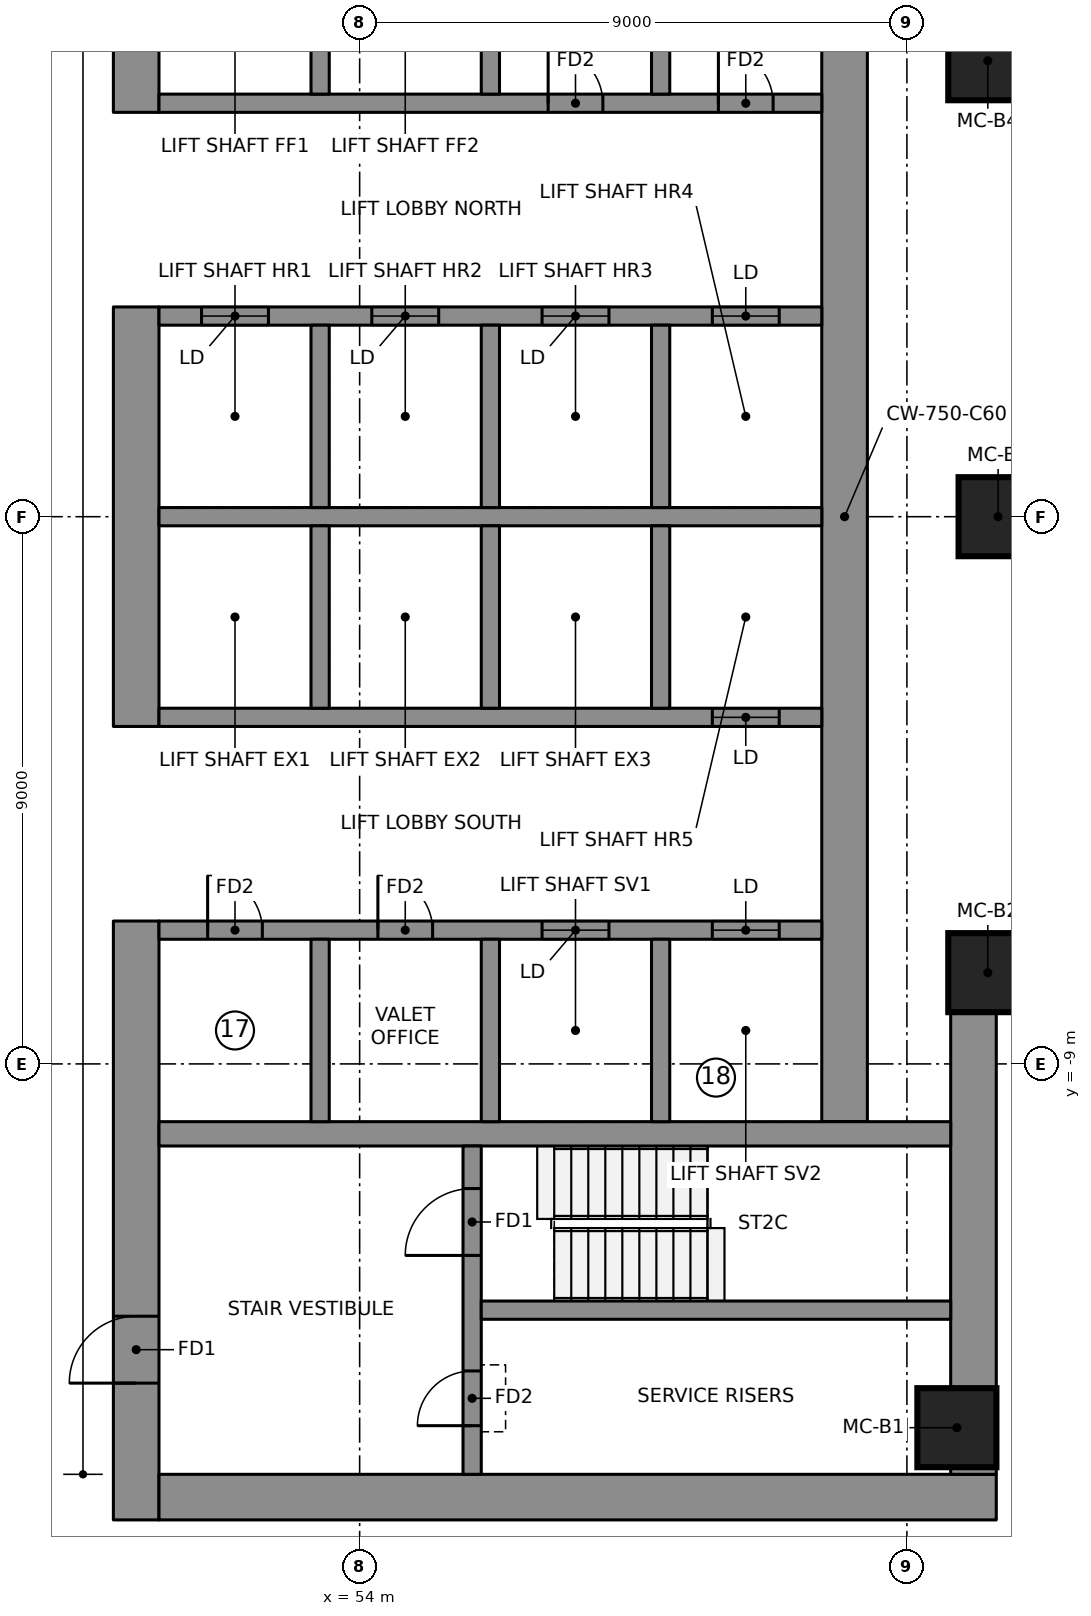
"""IFC4 building model, lengths in metres.
Left out: names, types, materials, properties, quantities, classifications, styles, units other than length and angle.
Written with IfcOpenShell. Run it as: python <this file> out.ifc"""

import sys

from ifc_helpers import new_model, si_unit, direction, frame, frame_2d, origin, origin_2d, place, context, subcontext, project, spatial, rectangle, extrude, element, fill, save


model = new_model("IFC4")
c1 = context("Model", 3, precision=1e-05, world=origin(), true_north=direction((0.0, 1.0)))
c2 = subcontext(c1, "Body", "Model", "MODEL_VIEW")
j1 = project(units=[si_unit("LENGTHUNIT", "METRE"), si_unit("PLANEANGLEUNIT", "RADIAN")], contexts=[c1])
p1 = place(None, origin())
s1 = spatial("IfcSite", under=j1, at=p1, CompositionType="ELEMENT")
p2 = place(p1, origin())
s2 = spatial("IfcBuilding", under=s1, at=p2, CompositionType="ELEMENT")
p3 = place(p2, frame((0.0, 0.0, 200.35)))
s3 = spatial("IfcBuildingStorey", under=s2, at=p3, CompositionType="ELEMENT", Elevation=200.35)
p4 = place(p3, frame((50.325, 6.65, 0.0), z_axis=(0.0, 0.0, 1.0), x_axis=(0.0, 1.0, 0.0)))
e1 = element("IfcWall", 1, at=p4, inside=s3, PredefinedType="SHEAR", context=c2, shape_type="SweptSolid", body=[
    extrude(rectangle(XDim=9.85, YDim=0.75, at=frame_2d((4.925, 0.0))), origin(), (0.0, 0.0, 1.0), 3.55),
])
p5 = place(p4, frame((6.5, 0.0, 0.0)))
e2 = element("IfcOpeningElement", 2, at=p5, cuts=e1, PredefinedType="OPENING", context=c2, shape_type="SweptSolid", body=[
    extrude(rectangle(XDim=1.1, YDim=2.1, at=frame_2d((0.55, 1.05))), frame((0.0, 0.385, 0.0), z_axis=(0.0, -1.0, 0.0), x_axis=(1.0, 0.0, 0.0)), (0.0, 0.0, 1.0), 0.77),
])
p6 = place(p3, frame((50.325, -3.45, 0.0), z_axis=(0.0, 0.0, 1.0), x_axis=(0.0, 1.0, 0.0)))
e3 = element("IfcWall", 3, at=p6, inside=s3, PredefinedType="SHEAR", context=c2, shape_type="SweptSolid", body=[
    extrude(rectangle(XDim=6.9, YDim=0.75, at=frame_2d((3.45, 0.0))), origin(), (0.0, 0.0, 1.0), 3.55),
])
p7 = place(p3, frame((50.325, -16.5, 0.0), z_axis=(0.0, 0.0, 1.0), x_axis=(0.0, 1.0, 0.0)))
e4 = element("IfcWall", 4, at=p7, inside=s3, PredefinedType="SHEAR", context=c2, shape_type="SweptSolid", body=[
    extrude(rectangle(XDim=9.85, YDim=0.75, at=frame_2d((4.925, 0.0))), origin(), (0.0, 0.0, 1.0), 3.55),
])
p8 = place(p7, frame((2.25, 0.0, 0.0)))
e5 = element("IfcOpeningElement", 5, at=p8, cuts=e4, PredefinedType="OPENING", context=c2, shape_type="SweptSolid", body=[
    extrude(rectangle(XDim=1.1, YDim=2.1, at=frame_2d((0.55, 1.05))), frame((0.0, 0.385, 0.0), z_axis=(0.0, -1.0, 0.0), x_axis=(1.0, 0.0, 0.0)), (0.0, 0.0, 1.0), 0.77),
])
p9 = place(p3, frame((50.7, -16.125, 0.0), z_axis=(0.0, 0.0, 1.0), x_axis=(1.0, 0.0, 0.0)))
e6 = element("IfcWall", 6, at=p9, inside=s3, PredefinedType="SHEAR", context=c2, shape_type="SweptSolid", body=[
    extrude(rectangle(XDim=13.77, YDim=0.75, at=frame_2d((6.885, 0.0))), origin(), (0.0, 0.0, 1.0), 3.55),
])
p10 = place(p3, frame((64.095, -15.75, 0.0), z_axis=(0.0, 0.0, 1.0), x_axis=(0.0, 1.0, 0.0)))
e7 = element("IfcWall", 7, at=p10, inside=s3, PredefinedType="SHEAR", context=c2, shape_type="SweptSolid", body=[
    extrude(rectangle(XDim=7.651, YDim=0.75, at=frame_2d((3.825, 0.0))), origin(), (0.0, 0.0, 1.0), 3.55),
])
p11 = place(p3, frame((61.975, -9.95, 0.0), z_axis=(0.0, 0.0, 1.0), x_axis=(0.0, 1.0, 0.0)))
e8 = element("IfcWall", 8, at=p11, inside=s3, PredefinedType="SHEAR", context=c2, shape_type="SweptSolid", body=[
    extrude(rectangle(XDim=19.9, YDim=0.75, at=frame_2d((9.95, 0.0))), origin(), (0.0, 0.0, 1.0), 3.55),
])
p12 = place(p3, frame((50.7, -10.15, 0.0), z_axis=(0.0, 0.0, 1.0), x_axis=(1.0, 0.0, 0.0)))
e9 = element("IfcWall", 9, at=p12, inside=s3, PredefinedType="SHEAR", context=c2, shape_type="SweptSolid", body=[
    extrude(rectangle(XDim=13.02, YDim=0.4, at=frame_2d((6.51, 0.0))), origin(), (0.0, 0.0, 1.0), 3.55),
])
p13 = place(p3, frame((50.7, 0.0, 0.0), z_axis=(0.0, 0.0, 1.0), x_axis=(1.0, 0.0, 0.0)))
e10 = element("IfcWall", 10, at=p13, inside=s3, PredefinedType="SHEAR", context=c2, shape_type="SweptSolid", body=[
    extrude(rectangle(XDim=10.9, YDim=0.3, at=frame_2d((5.45, 0.0))), origin(), (0.0, 0.0, 1.0), 3.55),
])
p14 = place(p3, frame((50.7, 3.3, 0.0), z_axis=(0.0, 0.0, 1.0), x_axis=(1.0, 0.0, 0.0)))
e11 = element("IfcWall", 11, at=p14, inside=s3, PredefinedType="SHEAR", context=c2, shape_type="SweptSolid", body=[
    extrude(rectangle(XDim=10.9, YDim=0.3, at=frame_2d((5.45, 0.0))), origin(), (0.0, 0.0, 1.0), 3.55),
])
p15 = place(p14, frame((0.7, 0.0, 0.0)))
e12 = element("IfcOpeningElement", 12, at=p15, cuts=e11, PredefinedType="OPENING", context=c2, shape_type="SweptSolid", body=[
    extrude(rectangle(XDim=1.1, YDim=2.1, at=frame_2d((0.55, 1.05))), frame((0.0, 0.16, 0.0), z_axis=(0.0, -1.0, 0.0), x_axis=(1.0, 0.0, 0.0)), (0.0, 0.0, 1.0), 0.32),
])
p16 = place(p14, frame((3.5, 0.0, 0.0)))
e13 = element("IfcOpeningElement", 13, at=p16, cuts=e11, PredefinedType="OPENING", context=c2, shape_type="SweptSolid", body=[
    extrude(rectangle(XDim=1.1, YDim=2.1, at=frame_2d((0.55, 1.05))), frame((0.0, 0.16, 0.0), z_axis=(0.0, -1.0, 0.0), x_axis=(1.0, 0.0, 0.0)), (0.0, 0.0, 1.0), 0.32),
])
p17 = place(p14, frame((6.3, 0.0, 0.0)))
e14 = element("IfcOpeningElement", 14, at=p17, cuts=e11, PredefinedType="OPENING", context=c2, shape_type="SweptSolid", body=[
    extrude(rectangle(XDim=1.1, YDim=2.1, at=frame_2d((0.55, 1.05))), frame((0.0, 0.16, 0.0), z_axis=(0.0, -1.0, 0.0), x_axis=(1.0, 0.0, 0.0)), (0.0, 0.0, 1.0), 0.32),
])
p18 = place(p14, frame((9.1, 0.0, 0.0)))
e15 = element("IfcOpeningElement", 15, at=p18, cuts=e11, PredefinedType="OPENING", context=c2, shape_type="SweptSolid", body=[
    extrude(rectangle(XDim=1.1, YDim=2.1, at=frame_2d((0.55, 1.05))), frame((0.0, 0.16, 0.0), z_axis=(0.0, -1.0, 0.0), x_axis=(1.0, 0.0, 0.0)), (0.0, 0.0, 1.0), 0.32),
])
p19 = place(p3, frame((50.7, 6.8, 0.0), z_axis=(0.0, 0.0, 1.0), x_axis=(1.0, 0.0, 0.0)))
e16 = element("IfcWall", 16, at=p19, inside=s3, PredefinedType="SHEAR", context=c2, shape_type="SweptSolid", body=[
    extrude(rectangle(XDim=10.9, YDim=0.3, at=frame_2d((5.45, 0.0))), origin(), (0.0, 0.0, 1.0), 3.55),
])
p20 = place(p19, frame((6.4, 0.0, 0.0)))
e17 = element("IfcOpeningElement", 17, at=p20, cuts=e16, PredefinedType="OPENING", context=c2, shape_type="SweptSolid", body=[
    extrude(rectangle(XDim=0.9, YDim=2.1, at=frame_2d((0.45, 1.05))), frame((0.0, 0.16, 0.0), z_axis=(0.0, -1.0, 0.0), x_axis=(1.0, 0.0, 0.0)), (0.0, 0.0, 1.0), 0.32),
])
p21 = place(p19, frame((9.2, 0.0, 0.0)))
e18 = element("IfcOpeningElement", 18, at=p21, cuts=e16, PredefinedType="OPENING", context=c2, shape_type="SweptSolid", body=[
    extrude(rectangle(XDim=0.9, YDim=2.1, at=frame_2d((0.45, 1.05))), frame((0.0, 0.16, 0.0), z_axis=(0.0, -1.0, 0.0), x_axis=(1.0, 0.0, 0.0)), (0.0, 0.0, 1.0), 0.32),
])
for number, where, z_axis, x_axis in (
    (19, (53.35, 0.15, 0.0), (0.0, 0.0, 1.0), (0.0, 1.0, 0.0)),
    (20, (53.35, 6.95, 0.0), (0.0, 0.0, 1.0), (0.0, 1.0, 0.0)),
    (21, (56.15, 0.15, 0.0), (0.0, 0.0, 1.0), (0.0, 1.0, 0.0)),
    (22, (56.15, 6.95, 0.0), (0.0, 0.0, 1.0), (0.0, 1.0, 0.0)),
    (23, (58.95, 0.15, 0.0), (0.0, 0.0, 1.0), (0.0, 1.0, 0.0)),
    (24, (58.95, 6.95, 0.0), (0.0, 0.0, 1.0), (0.0, 1.0, 0.0)),
):
    element("IfcWall", number, at=place(p3, frame(where, z_axis=z_axis, x_axis=x_axis)), inside=s3, PredefinedType="SHEAR", context=c2, shape_type="SweptSolid", body=[
        extrude(rectangle(XDim=3.0, YDim=0.3, at=frame_2d((1.5, 0.0))), origin(), (0.0, 0.0, 1.0), 3.55),
    ])
p22 = place(p3, frame((50.7, -3.3, 0.0), z_axis=(0.0, 0.0, 1.0), x_axis=(1.0, 0.0, 0.0)))
e25 = element("IfcWall", 25, at=p22, inside=s3, PredefinedType="SHEAR", context=c2, shape_type="SweptSolid", body=[
    extrude(rectangle(XDim=10.9, YDim=0.3, at=frame_2d((5.45, 0.0))), origin(), (0.0, 0.0, 1.0), 3.55),
])
p23 = place(p22, frame((9.1, 0.0, 0.0)))
e26 = element("IfcOpeningElement", 26, at=p23, cuts=e25, PredefinedType="OPENING", context=c2, shape_type="SweptSolid", body=[
    extrude(rectangle(XDim=1.1, YDim=2.1, at=frame_2d((0.55, 1.05))), frame((0.0, 0.16, 0.0), z_axis=(0.0, -1.0, 0.0), x_axis=(1.0, 0.0, 0.0)), (0.0, 0.0, 1.0), 0.32),
])
p24 = place(p3, frame((50.7, -6.8, 0.0), z_axis=(0.0, 0.0, 1.0), x_axis=(1.0, 0.0, 0.0)))
e27 = element("IfcWall", 27, at=p24, inside=s3, PredefinedType="SHEAR", context=c2, shape_type="SweptSolid", body=[
    extrude(rectangle(XDim=10.9, YDim=0.3, at=frame_2d((5.45, 0.0))), origin(), (0.0, 0.0, 1.0), 3.55),
])
p25 = place(p24, frame((6.3, 0.0, 0.0)))
e28 = element("IfcOpeningElement", 28, at=p25, cuts=e27, PredefinedType="OPENING", context=c2, shape_type="SweptSolid", body=[
    extrude(rectangle(XDim=1.1, YDim=2.1, at=frame_2d((0.55, 1.05))), frame((0.0, 0.16, 0.0), z_axis=(0.0, -1.0, 0.0), x_axis=(1.0, 0.0, 0.0)), (0.0, 0.0, 1.0), 0.32),
])
p26 = place(p24, frame((9.1, 0.0, 0.0)))
e29 = element("IfcOpeningElement", 29, at=p26, cuts=e27, PredefinedType="OPENING", context=c2, shape_type="SweptSolid", body=[
    extrude(rectangle(XDim=1.1, YDim=2.1, at=frame_2d((0.55, 1.05))), frame((0.0, 0.16, 0.0), z_axis=(0.0, -1.0, 0.0), x_axis=(1.0, 0.0, 0.0)), (0.0, 0.0, 1.0), 0.32),
])
p27 = place(p24, frame((0.8, 0.0, 0.0)))
e30 = element("IfcOpeningElement", 30, at=p27, cuts=e27, PredefinedType="OPENING", context=c2, shape_type="SweptSolid", body=[
    extrude(rectangle(XDim=0.9, YDim=2.1, at=frame_2d((0.45, 1.05))), frame((0.0, 0.16, 0.0), z_axis=(0.0, -1.0, 0.0), x_axis=(1.0, 0.0, 0.0)), (0.0, 0.0, 1.0), 0.32),
])
p28 = place(p24, frame((3.6, 0.0, 0.0)))
e31 = element("IfcOpeningElement", 31, at=p28, cuts=e27, PredefinedType="OPENING", context=c2, shape_type="SweptSolid", body=[
    extrude(rectangle(XDim=0.9, YDim=2.1, at=frame_2d((0.45, 1.05))), frame((0.0, 0.16, 0.0), z_axis=(0.0, -1.0, 0.0), x_axis=(1.0, 0.0, 0.0)), (0.0, 0.0, 1.0), 0.32),
])
for number, where, z_axis, x_axis in (
    (32, (53.35, -3.15, 0.0), (0.0, 0.0, 1.0), (0.0, 1.0, 0.0)),
    (33, (53.35, -9.95, 0.0), (0.0, 0.0, 1.0), (0.0, 1.0, 0.0)),
    (34, (56.15, -3.15, 0.0), (0.0, 0.0, 1.0), (0.0, 1.0, 0.0)),
    (35, (56.15, -9.95, 0.0), (0.0, 0.0, 1.0), (0.0, 1.0, 0.0)),
    (36, (58.95, -3.15, 0.0), (0.0, 0.0, 1.0), (0.0, 1.0, 0.0)),
    (37, (58.95, -9.95, 0.0), (0.0, 0.0, 1.0), (0.0, 1.0, 0.0)),
):
    element("IfcWall", number, at=place(p3, frame(where, z_axis=z_axis, x_axis=x_axis)), inside=s3, PredefinedType="SHEAR", context=c2, shape_type="SweptSolid", body=[
        extrude(rectangle(XDim=3.0, YDim=0.3, at=frame_2d((1.5, 0.0))), origin(), (0.0, 0.0, 1.0), 3.55),
    ])
p29 = place(p3, frame((55.85, -15.75, 0.0), z_axis=(0.0, 0.0, 1.0), x_axis=(0.0, 1.0, 0.0)))
e38 = element("IfcWall", 38, at=p29, inside=s3, PredefinedType="SHEAR", context=c2, shape_type="SweptSolid", body=[
    extrude(rectangle(XDim=5.4, YDim=0.3, at=frame_2d((2.7, 0.0))), origin(), (0.0, 0.0, 1.0), 3.55),
])
p30 = place(p29, frame((3.6, 0.0, 0.0)))
e39 = element("IfcOpeningElement", 39, at=p30, cuts=e38, PredefinedType="OPENING", context=c2, shape_type="SweptSolid", body=[
    extrude(rectangle(XDim=1.1, YDim=2.1, at=frame_2d((0.55, 1.05))), frame((0.0, 0.16, 0.0), z_axis=(0.0, -1.0, 0.0), x_axis=(1.0, 0.0, 0.0)), (0.0, 0.0, 1.0), 0.32),
])
p31 = place(p29, frame((0.8, 0.0, 0.0)))
e40 = element("IfcOpeningElement", 40, at=p31, cuts=e38, PredefinedType="OPENING", context=c2, shape_type="SweptSolid", body=[
    extrude(rectangle(XDim=0.9, YDim=2.1, at=frame_2d((0.45, 1.05))), frame((0.0, 0.16, 0.0), z_axis=(0.0, -1.0, 0.0), x_axis=(1.0, 0.0, 0.0)), (0.0, 0.0, 1.0), 0.32),
])
p32 = place(p3, frame((56.0, -13.05, 0.0), z_axis=(0.0, 0.0, 1.0), x_axis=(1.0, 0.0, 0.0)))
e41 = element("IfcWall", 41, at=p32, inside=s3, PredefinedType="SHEAR", context=c2, shape_type="SweptSolid", body=[
    extrude(rectangle(XDim=7.72, YDim=0.3, at=frame_2d((3.86, 0.0))), origin(), (0.0, 0.0, 1.0), 3.55),
])
for number, where, z_axis, x_axis in (
    (42, (63.822, -14.983, 0.0), (0.0, 0.0, 1.0), (1.0, 0.0, 0.0)),
    (43, (64.33, -7.499, 0.0), (0.0, 0.0, 1.0), (1.0, 0.0, 0.0)),
    (44, (64.5, 0.0, 0.0), (0.0, 0.0, 1.0), (1.0, 0.0, 0.0)),
    (45, (64.33, 7.499, 0.0), (0.0, 0.0, 1.0), (1.0, 0.0, 0.0)),
):
    element("IfcColumn", number, at=place(p3, frame(where, z_axis=z_axis, x_axis=x_axis)), inside=s3, PredefinedType="COLUMN", context=c2, shape_type="SweptSolid", body=[
        extrude(rectangle(XDim=1.3, YDim=1.3, at=origin_2d()), origin(), (0.0, 0.0, 1.0), 3.55),
    ])
p33 = place(p15, origin())
e46 = element("IfcDoor", 46, at=p33, inside=s3, OperationType="DOUBLE_DOOR_SLIDING", PredefinedType="DOOR", context=c2, shape_type="SweptSolid", body=[
    extrude(rectangle(XDim=1.1, YDim=2.1, at=frame_2d((0.55, 1.05))), frame((0.0, 0.025, 0.0), z_axis=(0.0, -1.0, 0.0), x_axis=(1.0, 0.0, 0.0)), (0.0, 0.0, 1.0), 0.05),
])
fill(e12, e46)
p34 = place(p16, origin())
e47 = element("IfcDoor", 47, at=p34, inside=s3, OperationType="DOUBLE_DOOR_SLIDING", PredefinedType="DOOR", context=c2, shape_type="SweptSolid", body=[
    extrude(rectangle(XDim=1.1, YDim=2.1, at=frame_2d((0.55, 1.05))), frame((0.0, 0.025, 0.0), z_axis=(0.0, -1.0, 0.0), x_axis=(1.0, 0.0, 0.0)), (0.0, 0.0, 1.0), 0.05),
])
fill(e13, e47)
p35 = place(p17, origin())
e48 = element("IfcDoor", 48, at=p35, inside=s3, OperationType="DOUBLE_DOOR_SLIDING", PredefinedType="DOOR", context=c2, shape_type="SweptSolid", body=[
    extrude(rectangle(XDim=1.1, YDim=2.1, at=frame_2d((0.55, 1.05))), frame((0.0, 0.025, 0.0), z_axis=(0.0, -1.0, 0.0), x_axis=(1.0, 0.0, 0.0)), (0.0, 0.0, 1.0), 0.05),
])
fill(e14, e48)
p36 = place(p18, origin())
e49 = element("IfcDoor", 49, at=p36, inside=s3, OperationType="DOUBLE_DOOR_SLIDING", PredefinedType="DOOR", context=c2, shape_type="SweptSolid", body=[
    extrude(rectangle(XDim=1.1, YDim=2.1, at=frame_2d((0.55, 1.05))), frame((0.0, 0.025, 0.0), z_axis=(0.0, -1.0, 0.0), x_axis=(1.0, 0.0, 0.0)), (0.0, 0.0, 1.0), 0.05),
])
fill(e15, e49)
p37 = place(p23, origin())
e50 = element("IfcDoor", 50, at=p37, inside=s3, OperationType="DOUBLE_DOOR_SLIDING", PredefinedType="DOOR", context=c2, shape_type="SweptSolid", body=[
    extrude(rectangle(XDim=1.1, YDim=2.1, at=frame_2d((0.55, 1.05))), frame((0.0, 0.025, 0.0), z_axis=(0.0, -1.0, 0.0), x_axis=(1.0, 0.0, 0.0)), (0.0, 0.0, 1.0), 0.05),
])
fill(e26, e50)
p38 = place(p25, origin())
e51 = element("IfcDoor", 51, at=p38, inside=s3, OperationType="DOUBLE_DOOR_SLIDING", PredefinedType="DOOR", context=c2, shape_type="SweptSolid", body=[
    extrude(rectangle(XDim=1.1, YDim=2.1, at=frame_2d((0.55, 1.05))), frame((0.0, 0.025, 0.0), z_axis=(0.0, -1.0, 0.0), x_axis=(1.0, 0.0, 0.0)), (0.0, 0.0, 1.0), 0.05),
])
fill(e28, e51)
p39 = place(p26, origin())
e52 = element("IfcDoor", 52, at=p39, inside=s3, OperationType="DOUBLE_DOOR_SLIDING", PredefinedType="DOOR", context=c2, shape_type="SweptSolid", body=[
    extrude(rectangle(XDim=1.1, YDim=2.1, at=frame_2d((0.55, 1.05))), frame((0.0, 0.025, 0.0), z_axis=(0.0, -1.0, 0.0), x_axis=(1.0, 0.0, 0.0)), (0.0, 0.0, 1.0), 0.05),
])
fill(e29, e52)
p40 = place(p30, origin())
e53 = element("IfcDoor", 53, at=p40, inside=s3, OperationType="SINGLE_SWING_RIGHT", PredefinedType="DOOR", context=c2, shape_type="SweptSolid", body=[
    extrude(rectangle(XDim=1.1, YDim=2.1, at=frame_2d((0.55, 1.05))), frame((0.0, 0.025, 0.0), z_axis=(0.0, -1.0, 0.0), x_axis=(1.0, 0.0, 0.0)), (0.0, 0.0, 1.0), 0.05),
])
fill(e39, e53)
p41 = place(p8, origin())
e54 = element("IfcDoor", 54, at=p41, inside=s3, OperationType="SINGLE_SWING_RIGHT", PredefinedType="DOOR", context=c2, shape_type="SweptSolid", body=[
    extrude(rectangle(XDim=1.1, YDim=2.1, at=frame_2d((0.55, 1.05))), frame((0.0, 0.025, 0.0), z_axis=(0.0, -1.0, 0.0), x_axis=(1.0, 0.0, 0.0)), (0.0, 0.0, 1.0), 0.05),
])
fill(e5, e54)
p42 = place(p31, origin())
e55 = element("IfcDoor", 55, at=p42, inside=s3, OperationType="SINGLE_SWING_LEFT", PredefinedType="DOOR", context=c2, shape_type="SweptSolid", body=[
    extrude(rectangle(XDim=0.9, YDim=2.1, at=frame_2d((0.45, 1.05))), frame((0.0, 0.025, 0.0), z_axis=(0.0, -1.0, 0.0), x_axis=(1.0, 0.0, 0.0)), (0.0, 0.0, 1.0), 0.05),
])
fill(e40, e55)
p43 = place(p20, origin())
e56 = element("IfcDoor", 56, at=p43, inside=s3, OperationType="SINGLE_SWING_LEFT", PredefinedType="DOOR", context=c2, shape_type="SweptSolid", body=[
    extrude(rectangle(XDim=0.9, YDim=2.1, at=frame_2d((0.45, 1.05))), frame((0.0, 0.025, 0.0), z_axis=(0.0, -1.0, 0.0), x_axis=(1.0, 0.0, 0.0)), (0.0, 0.0, 1.0), 0.05),
])
fill(e17, e56)
p44 = place(p21, origin())
e57 = element("IfcDoor", 57, at=p44, inside=s3, OperationType="SINGLE_SWING_LEFT", PredefinedType="DOOR", context=c2, shape_type="SweptSolid", body=[
    extrude(rectangle(XDim=0.9, YDim=2.1, at=frame_2d((0.45, 1.05))), frame((0.0, 0.025, 0.0), z_axis=(0.0, -1.0, 0.0), x_axis=(1.0, 0.0, 0.0)), (0.0, 0.0, 1.0), 0.05),
])
fill(e18, e57)
p45 = place(p27, origin())
e58 = element("IfcDoor", 58, at=p45, inside=s3, OperationType="SINGLE_SWING_LEFT", PredefinedType="DOOR", context=c2, shape_type="SweptSolid", body=[
    extrude(rectangle(XDim=0.9, YDim=2.1, at=frame_2d((0.45, 1.05))), frame((0.0, 0.025, 0.0), z_axis=(0.0, -1.0, 0.0), x_axis=(1.0, 0.0, 0.0)), (0.0, 0.0, 1.0), 0.05),
])
fill(e30, e58)
p46 = place(p28, origin())
e59 = element("IfcDoor", 59, at=p46, inside=s3, OperationType="SINGLE_SWING_LEFT", PredefinedType="DOOR", context=c2, shape_type="SweptSolid", body=[
    extrude(rectangle(XDim=0.9, YDim=2.1, at=frame_2d((0.45, 1.05))), frame((0.0, 0.025, 0.0), z_axis=(0.0, -1.0, 0.0), x_axis=(1.0, 0.0, 0.0)), (0.0, 0.0, 1.0), 0.05),
])
fill(e31, e59)
save(model, sys.argv[1])
